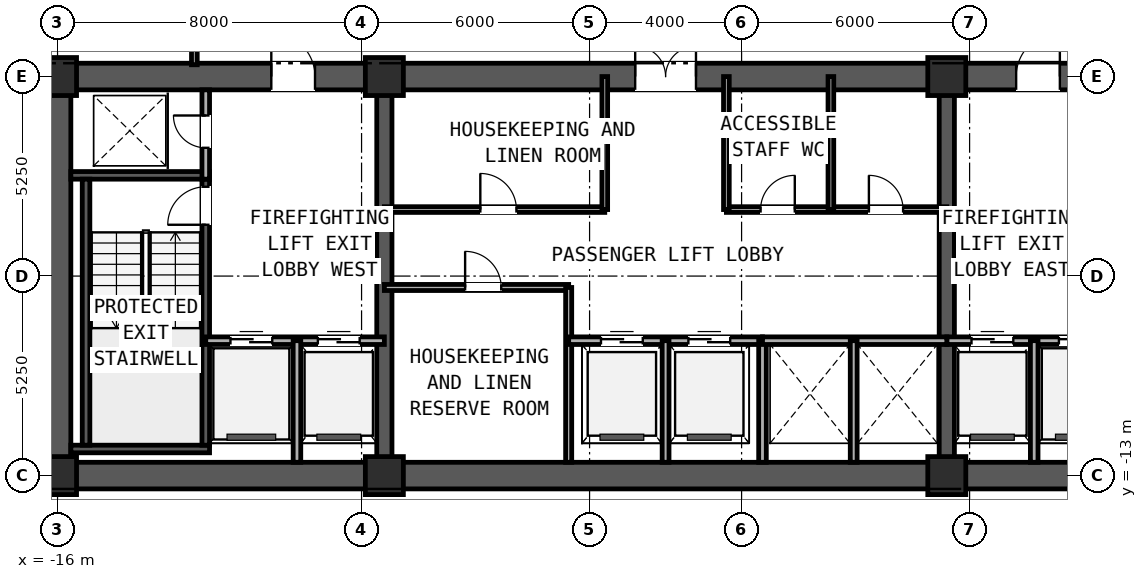
"""IFC4 building model, lengths in metres.
Left out: names, types, materials, properties, quantities, classifications, styles, units other than length and angle.
Written with IfcOpenShell. Run it as: python <this file> out.ifc"""

import sys

from ifc_helpers import new_model, si_unit, direction, frame, frame_2d, origin, origin_2d, place, context, subcontext, project, spatial, rectangle, extrude, element, fill, save


model = new_model("IFC4")
c1 = context("Model", 3, precision=1e-05, world=origin(), true_north=direction((0.0, 1.0)))
c2 = subcontext(c1, "Body", "Model", "MODEL_VIEW")
j1 = project(units=[si_unit("LENGTHUNIT", "METRE"), si_unit("PLANEANGLEUNIT", "RADIAN")], contexts=[c1])
p1 = place(None, origin())
s1 = spatial("IfcSite", under=j1, at=p1, CompositionType="ELEMENT")
p2 = place(p1, origin())
s2 = spatial("IfcBuilding", under=s1, at=p2, CompositionType="ELEMENT")
p3 = place(p2, frame((0.0, 0.0, 146.25)))
s3 = spatial("IfcBuildingStorey", under=s2, at=p3, CompositionType="ELEMENT", Elevation=146.25)
p4 = place(p3, frame((-16.35, -13.0, 0.0), z_axis=(0.0, 0.0, 1.0), x_axis=(1.0, 0.0, 0.0)))
e1 = element("IfcWall", 1, at=p4, inside=s3, PredefinedType="SHEAR", context=c2, shape_type="SweptSolid", body=[
    extrude(rectangle(XDim=32.7, YDim=0.7, at=frame_2d((16.35, 0.0))), origin(), (0.0, 0.0, 1.0), 2.91),
])
p5 = place(p3, frame((-16.35, -2.5, 0.0), z_axis=(0.0, 0.0, 1.0), x_axis=(1.0, 0.0, 0.0)))
e2 = element("IfcWall", 2, at=p5, inside=s3, PredefinedType="SHEAR", context=c2, shape_type="SweptSolid", body=[
    extrude(rectangle(XDim=32.7, YDim=0.7, at=frame_2d((16.35, 0.0))), origin(), (0.0, 0.0, 1.0), 2.91),
])
p6 = place(p5, frame((5.975, 0.0, 0.0)))
e3 = element("IfcOpeningElement", 3, at=p6, cuts=e2, PredefinedType="OPENING", context=c2, shape_type="SweptSolid", body=[
    extrude(rectangle(XDim=1.15, YDim=2.0, at=frame_2d((0.575, 1.0))), frame((0.0, 0.36, 0.0), z_axis=(0.0, -1.0, 0.0), x_axis=(1.0, 0.0, 0.0)), (0.0, 0.0, 1.0), 0.72),
])
p7 = place(p5, frame((15.55, 0.0, 0.0)))
e4 = element("IfcOpeningElement", 4, at=p7, cuts=e2, PredefinedType="OPENING", context=c2, shape_type="SweptSolid", body=[
    extrude(rectangle(XDim=1.6, YDim=2.0, at=frame_2d((0.8, 1.0))), frame((0.0, 0.36, 0.0), z_axis=(0.0, -1.0, 0.0), x_axis=(1.0, 0.0, 0.0)), (0.0, 0.0, 1.0), 0.72),
])
p8 = place(p5, frame((25.575, 0.0, 0.0)))
e5 = element("IfcOpeningElement", 5, at=p8, cuts=e2, PredefinedType="OPENING", context=c2, shape_type="SweptSolid", body=[
    extrude(rectangle(XDim=1.15, YDim=2.0, at=frame_2d((0.575, 1.0))), frame((0.0, 0.36, 0.0), z_axis=(0.0, -1.0, 0.0), x_axis=(1.0, 0.0, 0.0)), (0.0, 0.0, 1.0), 0.72),
])
p9 = place(p3, frame((-16.0, -12.65, 0.0), z_axis=(0.0, 0.0, 1.0), x_axis=(0.0, 1.0, 0.0)))
e6 = element("IfcWall", 6, at=p9, inside=s3, PredefinedType="SHEAR", context=c2, shape_type="SweptSolid", body=[
    extrude(rectangle(XDim=9.8, YDim=0.7, at=frame_2d((4.9, 0.0))), origin(), (0.0, 0.0, 1.0), 2.91),
])
for number, where, z_axis, x_axis in (
    (7, (-7.4, -12.65, 0.0), (0.0, 0.0, 1.0), (0.0, 1.0, 0.0)),
    (8, (7.4, -12.65, 0.0), (0.0, 0.0, 1.0), (0.0, 1.0, 0.0)),
):
    element("IfcWall", number, at=place(p3, frame(where, z_axis=z_axis, x_axis=x_axis)), inside=s3, PredefinedType="SHEAR", context=c2, shape_type="SweptSolid", body=[
        extrude(rectangle(XDim=9.8, YDim=0.4, at=frame_2d((4.9, 0.0))), origin(), (0.0, 0.0, 1.0), 3.19),
    ])
for number, where, z_axis, x_axis in (
    (9, (-15.65, -12.3, 0.0), (0.0, 0.0, 1.0), (1.0, 0.0, 0.0)),
    (10, (-15.65, -5.1, 0.0), (0.0, 0.0, 1.0), (1.0, 0.0, 0.0)),
):
    element("IfcWall", number, at=place(p3, frame(where, z_axis=z_axis, x_axis=x_axis)), inside=s3, PredefinedType="SOLIDWALL", context=c2, shape_type="SweptSolid", body=[
        extrude(rectangle(XDim=3.65, YDim=0.2, at=frame_2d((1.825, 0.0))), origin(), (0.0, 0.0, 1.0), 3.19),
    ])
p10 = place(p3, frame((-15.25, -12.2, 0.0), z_axis=(0.0, 0.0, 1.0), x_axis=(0.0, 1.0, 0.0)))
e11 = element("IfcWall", 11, at=p10, inside=s3, PredefinedType="SOLIDWALL", context=c2, shape_type="SweptSolid", body=[
    extrude(rectangle(XDim=7.0, YDim=0.2, at=frame_2d((3.5, 0.0))), origin(), (0.0, 0.0, 1.0), 3.19),
])
p11 = place(p3, frame((-12.1, -12.2, 0.0), z_axis=(0.0, 0.0, 1.0), x_axis=(0.0, 1.0, 0.0)))
e12 = element("IfcWall", 12, at=p11, inside=s3, PredefinedType="SOLIDWALL", context=c2, shape_type="SweptSolid", body=[
    extrude(rectangle(XDim=7.0, YDim=0.2, at=frame_2d((3.5, 0.0))), origin(), (0.0, 0.0, 1.0), 3.19),
])
p12 = place(p11, frame((5.8, 0.0, 0.0)))
e13 = element("IfcOpeningElement", 13, at=p12, cuts=e12, PredefinedType="OPENING", context=c2, shape_type="SweptSolid", body=[
    extrude(rectangle(XDim=1.0, YDim=2.1, at=frame_2d((0.5, 1.05))), frame((0.0, 0.11, 0.0), z_axis=(0.0, -1.0, 0.0), x_axis=(1.0, 0.0, 0.0)), (0.0, 0.0, 1.0), 0.22),
])
for number, where, z_axis, x_axis in (
    (14, (-16.0, -13.0, 0.0), (0.0, 0.0, 1.0), (1.0, 0.0, 0.0)),
    (15, (-7.4, -13.0, 0.0), (0.0, 0.0, 1.0), (1.0, 0.0, 0.0)),
    (16, (7.4, -13.0, 0.0), (0.0, 0.0, 1.0), (1.0, 0.0, 0.0)),
    (17, (-16.0, -2.5, 0.0), (0.0, 0.0, 1.0), (1.0, 0.0, 0.0)),
    (18, (-7.4, -2.5, 0.0), (0.0, 0.0, 1.0), (1.0, 0.0, 0.0)),
    (19, (7.4, -2.5, 0.0), (0.0, 0.0, 1.0), (1.0, 0.0, 0.0)),
):
    element("IfcColumn", number, at=place(p3, frame(where, z_axis=z_axis, x_axis=x_axis)), inside=s3, PredefinedType="COLUMN", context=c2, shape_type="SweptSolid", body=[
        extrude(rectangle(XDim=1.0, YDim=1.0, at=origin_2d()), origin(), (0.0, 0.0, 1.0), 3.45),
    ])
p13 = place(p3, frame((-26.695, -13.016, 0.0), z_axis=(0.0, 0.0, 1.0), x_axis=(0.995396268366, -0.095845025554, 0.0)))
e20 = element("IfcWall", 20, at=p13, inside=s3, PredefinedType="STANDARD", context=c2, shape_type="SweptSolid", body=[
    extrude(rectangle(XDim=49.6, YDim=0.24, at=frame_2d((24.8, 0.0))), origin(), (0.0, 0.0, 1.0), 3.19),
])
p14 = place(p13, frame((6.044, 0.0, 0.7)))
e21 = element("IfcOpeningElement", 21, at=p14, cuts=e20, PredefinedType="OPENING", context=c2, shape_type="SweptSolid", body=[
    extrude(rectangle(XDim=1.8, YDim=1.5, at=frame_2d((0.9, 0.75))), frame((0.0, 0.13, 0.0), z_axis=(0.0, -1.0, 0.0), x_axis=(1.0, 0.0, 0.0)), (0.0, 0.0, 1.0), 0.26),
])
p15 = place(p13, frame((41.756, 0.0, 0.7)))
e22 = element("IfcOpeningElement", 22, at=p15, cuts=e20, PredefinedType="OPENING", context=c2, shape_type="SweptSolid", body=[
    extrude(rectangle(XDim=1.8, YDim=1.5, at=frame_2d((0.9, 0.75))), frame((0.0, 0.13, 0.0), z_axis=(0.0, -1.0, 0.0), x_axis=(1.0, 0.0, 0.0)), (0.0, 0.0, 1.0), 0.26),
])
p16 = place(p3, frame((-12.1, -5.2, 0.0), z_axis=(0.0, 0.0, 1.0), x_axis=(0.0, 1.0, 0.0)))
e23 = element("IfcWall", 23, at=p16, inside=s3, PredefinedType="PARTITIONING", context=c2, shape_type="SweptSolid", body=[
    extrude(rectangle(XDim=2.35, YDim=0.2, at=frame_2d((1.175, 0.0))), origin(), (0.0, 0.0, 1.0), 2.225),
])
p17 = place(p16, frame((0.825, 0.0, 0.0)))
e24 = element("IfcOpeningElement", 24, at=p17, cuts=e23, PredefinedType="OPENING", context=c2, shape_type="SweptSolid", body=[
    extrude(rectangle(XDim=0.85, YDim=2.05, at=frame_2d((0.425, 1.025))), frame((0.0, 0.11, 0.0), z_axis=(0.0, -1.0, 0.0), x_axis=(1.0, 0.0, 0.0)), (0.0, 0.0, 1.0), 0.22),
])
p18 = place(p3, frame((-12.1, -9.45, 0.0), z_axis=(0.0, 0.0, 1.0), x_axis=(1.0, 0.0, 0.0)))
e25 = element("IfcWall", 25, at=p18, inside=s3, PredefinedType="PARTITIONING", context=c2, shape_type="SweptSolid", body=[
    extrude(rectangle(XDim=4.7, YDim=0.2, at=frame_2d((2.35, 0.0))), origin(), (0.0, 0.0, 1.0), 3.19),
])
p19 = place(p18, frame((0.65, 0.0, 0.0)))
e26 = element("IfcOpeningElement", 26, at=p19, cuts=e25, PredefinedType="OPENING", context=c2, shape_type="SweptSolid", body=[
    extrude(rectangle(XDim=1.1, YDim=2.2, at=frame_2d((0.55, 1.1))), frame((0.0, 0.11, 0.0), z_axis=(0.0, -1.0, 0.0), x_axis=(1.0, 0.0, 0.0)), (0.0, 0.0, 1.0), 0.22),
])
p20 = place(p18, frame((2.95, 0.0, 0.0)))
e27 = element("IfcOpeningElement", 27, at=p20, cuts=e25, PredefinedType="OPENING", context=c2, shape_type="SweptSolid", body=[
    extrude(rectangle(XDim=1.1, YDim=2.2, at=frame_2d((0.55, 1.1))), frame((0.0, 0.11, 0.0), z_axis=(0.0, -1.0, 0.0), x_axis=(1.0, 0.0, 0.0)), (0.0, 0.0, 1.0), 0.22),
])
p21 = place(p3, frame((-9.7, -12.65, 0.0), z_axis=(0.0, 0.0, 1.0), x_axis=(0.0, 1.0, 0.0)))
e28 = element("IfcWall", 28, at=p21, inside=s3, PredefinedType="PARTITIONING", context=c2, shape_type="SweptSolid", body=[
    extrude(rectangle(XDim=3.2, YDim=0.2, at=frame_2d((1.6, 0.0))), origin(), (0.0, 0.0, 1.0), 2.225),
])
p22 = place(p3, frame((7.4, -9.45, 0.0), z_axis=(0.0, 0.0, 1.0), x_axis=(1.0, 0.0, 0.0)))
e29 = element("IfcWall", 29, at=p22, inside=s3, PredefinedType="PARTITIONING", context=c2, shape_type="SweptSolid", body=[
    extrude(rectangle(XDim=4.7, YDim=0.2, at=frame_2d((2.35, 0.0))), origin(), (0.0, 0.0, 1.0), 3.19),
])
p23 = place(p22, frame((2.95, 0.0, 0.0)))
e30 = element("IfcOpeningElement", 30, at=p23, cuts=e29, PredefinedType="OPENING", context=c2, shape_type="SweptSolid", body=[
    extrude(rectangle(XDim=1.1, YDim=2.2, at=frame_2d((0.55, 1.1))), frame((0.0, 0.11, 0.0), z_axis=(0.0, -1.0, 0.0), x_axis=(1.0, 0.0, 0.0)), (0.0, 0.0, 1.0), 0.22),
])
p24 = place(p22, frame((0.65, 0.0, 0.0)))
e31 = element("IfcOpeningElement", 31, at=p24, cuts=e29, PredefinedType="OPENING", context=c2, shape_type="SweptSolid", body=[
    extrude(rectangle(XDim=1.1, YDim=2.2, at=frame_2d((0.55, 1.1))), frame((0.0, 0.11, 0.0), z_axis=(0.0, -1.0, 0.0), x_axis=(1.0, 0.0, 0.0)), (0.0, 0.0, 1.0), 0.22),
])
p25 = place(p3, frame((9.7, -12.65, 0.0), z_axis=(0.0, 0.0, 1.0), x_axis=(0.0, 1.0, 0.0)))
e32 = element("IfcWall", 32, at=p25, inside=s3, PredefinedType="PARTITIONING", context=c2, shape_type="SweptSolid", body=[
    extrude(rectangle(XDim=3.2, YDim=0.2, at=frame_2d((1.6, 0.0))), origin(), (0.0, 0.0, 1.0), 2.225),
])
p26 = place(p3, frame((-7.4, -8.05, 0.0), z_axis=(0.0, 0.0, 1.0), x_axis=(1.0, 0.0, 0.0)))
e33 = element("IfcWall", 33, at=p26, inside=s3, PredefinedType="PARTITIONING", context=c2, shape_type="SweptSolid", body=[
    extrude(rectangle(XDim=4.85, YDim=0.16, at=frame_2d((2.425, 0.0))), origin(), (0.0, 0.0, 1.0), 3.19),
])
p27 = place(p26, frame((2.125, 0.0, 0.0)))
e34 = element("IfcOpeningElement", 34, at=p27, cuts=e33, PredefinedType="OPENING", context=c2, shape_type="SweptSolid", body=[
    extrude(rectangle(XDim=0.95, YDim=2.15, at=frame_2d((0.475, 1.075))), frame((0.0, 0.09, 0.0), z_axis=(0.0, -1.0, 0.0), x_axis=(1.0, 0.0, 0.0)), (0.0, 0.0, 1.0), 0.18),
])
p28 = place(p3, frame((-2.55, -12.65, 0.0), z_axis=(0.0, 0.0, 1.0), x_axis=(0.0, 1.0, 0.0)))
e35 = element("IfcWall", 35, at=p28, inside=s3, PredefinedType="PARTITIONING", context=c2, shape_type="SweptSolid", body=[
    extrude(rectangle(XDim=4.6, YDim=0.16, at=frame_2d((2.3, 0.0))), origin(), (0.0, 0.0, 1.0), 2.225),
])
p29 = place(p3, frame((-2.55, -9.45, 0.0), z_axis=(0.0, 0.0, 1.0), x_axis=(1.0, 0.0, 0.0)))
e36 = element("IfcWall", 36, at=p29, inside=s3, PredefinedType="PARTITIONING", context=c2, shape_type="SweptSolid", body=[
    extrude(rectangle(XDim=5.1, YDim=0.2, at=frame_2d((2.55, 0.0))), origin(), (0.0, 0.0, 1.0), 3.19),
])
p30 = place(p29, frame((0.85, 0.0, 0.0)))
e37 = element("IfcOpeningElement", 37, at=p30, cuts=e36, PredefinedType="OPENING", context=c2, shape_type="SweptSolid", body=[
    extrude(rectangle(XDim=1.1, YDim=2.2, at=frame_2d((0.55, 1.1))), frame((0.0, 0.11, 0.0), z_axis=(0.0, -1.0, 0.0), x_axis=(1.0, 0.0, 0.0)), (0.0, 0.0, 1.0), 0.22),
])
p31 = place(p29, frame((3.15, 0.0, 0.0)))
e38 = element("IfcOpeningElement", 38, at=p31, cuts=e36, PredefinedType="OPENING", context=c2, shape_type="SweptSolid", body=[
    extrude(rectangle(XDim=1.1, YDim=2.2, at=frame_2d((0.55, 1.1))), frame((0.0, 0.11, 0.0), z_axis=(0.0, -1.0, 0.0), x_axis=(1.0, 0.0, 0.0)), (0.0, 0.0, 1.0), 0.22),
])
p32 = place(p3, frame((0.0, -12.65, 0.0), z_axis=(0.0, 0.0, 1.0), x_axis=(0.0, 1.0, 0.0)))
e39 = element("IfcWall", 39, at=p32, inside=s3, PredefinedType="PARTITIONING", context=c2, shape_type="SweptSolid", body=[
    extrude(rectangle(XDim=3.2, YDim=0.18, at=frame_2d((1.6, 0.0))), origin(), (0.0, 0.0, 1.0), 2.225),
])
p33 = place(p3, frame((2.55, -12.65, 0.0), z_axis=(0.0, 0.0, 1.0), x_axis=(0.0, 1.0, 0.0)))
e40 = element("IfcWall", 40, at=p33, inside=s3, PredefinedType="PARTITIONING", context=c2, shape_type="SweptSolid", body=[
    extrude(rectangle(XDim=3.2, YDim=0.2, at=frame_2d((1.6, 0.0))), origin(), (0.0, 0.0, 1.0), 2.225),
])
p34 = place(p3, frame((2.55, -9.45, 0.0), z_axis=(0.0, 0.0, 1.0), x_axis=(1.0, 0.0, 0.0)))
e41 = element("IfcWall", 41, at=p34, inside=s3, PredefinedType="PARTITIONING", context=c2, shape_type="SweptSolid", body=[
    extrude(rectangle(XDim=4.85, YDim=0.2, at=frame_2d((2.425, 0.0))), origin(), (0.0, 0.0, 1.0), 3.19),
])
p35 = place(p3, frame((4.95, -12.65, 0.0), z_axis=(0.0, 0.0, 1.0), x_axis=(0.0, 1.0, 0.0)))
e42 = element("IfcWall", 42, at=p35, inside=s3, PredefinedType="PARTITIONING", context=c2, shape_type="SweptSolid", body=[
    extrude(rectangle(XDim=3.2, YDim=0.18, at=frame_2d((1.6, 0.0))), origin(), (0.0, 0.0, 1.0), 2.225),
])
p36 = place(p3, frame((-7.4, -6.0, 0.0), z_axis=(0.0, 0.0, 1.0), x_axis=(1.0, 0.0, 0.0)))
e43 = element("IfcWall", 43, at=p36, inside=s3, PredefinedType="PARTITIONING", context=c2, shape_type="SweptSolid", body=[
    extrude(rectangle(XDim=5.8, YDim=0.15, at=frame_2d((2.9, 0.0))), origin(), (0.0, 0.0, 1.0), 3.19),
])
p37 = place(p36, frame((2.525, 0.0, 0.0)))
e44 = element("IfcOpeningElement", 44, at=p37, cuts=e43, PredefinedType="OPENING", context=c2, shape_type="SweptSolid", body=[
    extrude(rectangle(XDim=0.95, YDim=2.15, at=frame_2d((0.475, 1.075))), frame((0.0, 0.085, 0.0), z_axis=(0.0, -1.0, 0.0), x_axis=(1.0, 0.0, 0.0)), (0.0, 0.0, 1.0), 0.17),
])
p38 = place(p3, frame((-1.6, -6.0, 0.0), z_axis=(0.0, 0.0, 1.0), x_axis=(0.0, 1.0, 0.0)))
e45 = element("IfcWall", 45, at=p38, inside=s3, PredefinedType="PARTITIONING", context=c2, shape_type="SweptSolid", body=[
    extrude(rectangle(XDim=3.5, YDim=0.15, at=frame_2d((1.75, 0.0))), origin(), (0.0, 0.0, 1.0), 2.225),
])
p39 = place(p3, frame((1.6, -6.0, 0.0), z_axis=(0.0, 0.0, 1.0), x_axis=(1.0, 0.0, 0.0)))
e46 = element("IfcWall", 46, at=p39, inside=s3, PredefinedType="PARTITIONING", context=c2, shape_type="SweptSolid", body=[
    extrude(rectangle(XDim=5.8, YDim=0.15, at=frame_2d((2.9, 0.0))), origin(), (0.0, 0.0, 1.0), 3.19),
])
p40 = place(p39, frame((0.9, 0.0, 0.0)))
e47 = element("IfcOpeningElement", 47, at=p40, cuts=e46, PredefinedType="OPENING", context=c2, shape_type="SweptSolid", body=[
    extrude(rectangle(XDim=0.9, YDim=2.1, at=frame_2d((0.45, 1.05))), frame((0.0, 0.085, 0.0), z_axis=(0.0, -1.0, 0.0), x_axis=(1.0, 0.0, 0.0)), (0.0, 0.0, 1.0), 0.17),
])
p41 = place(p39, frame((3.75, 0.0, 0.0)))
e48 = element("IfcOpeningElement", 48, at=p41, cuts=e46, PredefinedType="OPENING", context=c2, shape_type="SweptSolid", body=[
    extrude(rectangle(XDim=0.9, YDim=2.1, at=frame_2d((0.45, 1.05))), frame((0.0, 0.085, 0.0), z_axis=(0.0, -1.0, 0.0), x_axis=(1.0, 0.0, 0.0)), (0.0, 0.0, 1.0), 0.17),
])
for number, where, z_axis, x_axis in (
    (49, (1.6, -6.0, 0.0), (0.0, 0.0, 1.0), (0.0, 1.0, 0.0)),
    (50, (4.35, -6.0, 0.0), (0.0, 0.0, 1.0), (0.0, 1.0, 0.0)),
):
    element("IfcWall", number, at=place(p3, frame(where, z_axis=z_axis, x_axis=x_axis)), inside=s3, PredefinedType="PARTITIONING", context=c2, shape_type="SweptSolid", body=[
        extrude(rectangle(XDim=3.5, YDim=0.15, at=frame_2d((1.75, 0.0))), origin(), (0.0, 0.0, 1.0), 2.225),
    ])
p42 = place(p3, frame((-12.4, -2.19, 0.0), z_axis=(0.0, 0.0, 1.0), x_axis=(0.0, 1.0, 0.0)))
e51 = element("IfcWall", 51, at=p42, inside=s3, PredefinedType="PARTITIONING", context=c2, shape_type="SweptSolid", body=[
    extrude(rectangle(XDim=2.78, YDim=0.15, at=frame_2d((1.39, 0.0))), origin(), (0.0, 0.0, 1.0), 2.225),
])
p43 = place(p12, frame((1.0, 0.0, 0.0), z_axis=(0.0, 0.0, 1.0), x_axis=(-1.0, 0.0, 0.0)))
e52 = element("IfcDoor", 52, at=p43, inside=s3, OperationType="SINGLE_SWING_LEFT", PredefinedType="DOOR", context=c2, shape_type="SweptSolid", body=[
    extrude(rectangle(XDim=1.0, YDim=2.1, at=frame_2d((0.5, 1.05))), frame((0.0, 0.025, 0.0), z_axis=(0.0, -1.0, 0.0), x_axis=(1.0, 0.0, 0.0)), (0.0, 0.0, 1.0), 0.05),
])
fill(e13, e52)
p44 = place(p17, origin())
e53 = element("IfcDoor", 53, at=p44, inside=s3, OperationType="SINGLE_SWING_RIGHT", PredefinedType="DOOR", context=c2, shape_type="SweptSolid", body=[
    extrude(rectangle(XDim=0.85, YDim=2.05, at=frame_2d((0.425, 1.025))), frame((0.0, 0.025, 0.0), z_axis=(0.0, -1.0, 0.0), x_axis=(1.0, 0.0, 0.0)), (0.0, 0.0, 1.0), 0.05),
])
fill(e24, e53)
p45 = place(p19, origin())
e54 = element("IfcDoor", 54, at=p45, inside=s3, OperationType="SLIDING_TO_LEFT", PredefinedType="DOOR", context=c2, shape_type="SweptSolid", body=[
    extrude(rectangle(XDim=1.1, YDim=2.2, at=frame_2d((0.55, 1.1))), frame((0.0, 0.025, 0.0), z_axis=(0.0, -1.0, 0.0), x_axis=(1.0, 0.0, 0.0)), (0.0, 0.0, 1.0), 0.05),
])
fill(e26, e54)
p46 = place(p20, origin())
e55 = element("IfcDoor", 55, at=p46, inside=s3, OperationType="SLIDING_TO_RIGHT", PredefinedType="DOOR", context=c2, shape_type="SweptSolid", body=[
    extrude(rectangle(XDim=1.1, YDim=2.2, at=frame_2d((0.55, 1.1))), frame((0.0, 0.025, 0.0), z_axis=(0.0, -1.0, 0.0), x_axis=(1.0, 0.0, 0.0)), (0.0, 0.0, 1.0), 0.05),
])
fill(e27, e55)
p47 = place(p23, origin())
e56 = element("IfcDoor", 56, at=p47, inside=s3, OperationType="SLIDING_TO_LEFT", PredefinedType="DOOR", context=c2, shape_type="SweptSolid", body=[
    extrude(rectangle(XDim=1.1, YDim=2.2, at=frame_2d((0.55, 1.1))), frame((0.0, 0.025, 0.0), z_axis=(0.0, -1.0, 0.0), x_axis=(1.0, 0.0, 0.0)), (0.0, 0.0, 1.0), 0.05),
])
fill(e30, e56)
p48 = place(p24, origin())
e57 = element("IfcDoor", 57, at=p48, inside=s3, OperationType="SLIDING_TO_RIGHT", PredefinedType="DOOR", context=c2, shape_type="SweptSolid", body=[
    extrude(rectangle(XDim=1.1, YDim=2.2, at=frame_2d((0.55, 1.1))), frame((0.0, 0.025, 0.0), z_axis=(0.0, -1.0, 0.0), x_axis=(1.0, 0.0, 0.0)), (0.0, 0.0, 1.0), 0.05),
])
fill(e31, e57)
p49 = place(p6, origin())
e58 = element("IfcDoor", 58, at=p49, inside=s3, OperationType="SINGLE_SWING_LEFT", PredefinedType="DOOR", context=c2, shape_type="SweptSolid", body=[
    extrude(rectangle(XDim=1.15, YDim=2.0, at=frame_2d((0.575, 1.0))), frame((0.0, 0.025, 0.0), z_axis=(0.0, -1.0, 0.0), x_axis=(1.0, 0.0, 0.0)), (0.0, 0.0, 1.0), 0.05),
])
fill(e3, e58)
p50 = place(p7, origin())
e59 = element("IfcDoor", 59, at=p50, inside=s3, OperationType="DOUBLE_DOOR_SINGLE_SWING", PredefinedType="DOOR", context=c2, shape_type="SweptSolid", body=[
    extrude(rectangle(XDim=1.6, YDim=2.0, at=frame_2d((0.8, 1.0))), frame((0.0, 0.025, 0.0), z_axis=(0.0, -1.0, 0.0), x_axis=(1.0, 0.0, 0.0)), (0.0, 0.0, 1.0), 0.05),
])
fill(e4, e59)
p51 = place(p8, origin())
e60 = element("IfcDoor", 60, at=p51, inside=s3, OperationType="SINGLE_SWING_RIGHT", PredefinedType="DOOR", context=c2, shape_type="SweptSolid", body=[
    extrude(rectangle(XDim=1.15, YDim=2.0, at=frame_2d((0.575, 1.0))), frame((0.0, 0.025, 0.0), z_axis=(0.0, -1.0, 0.0), x_axis=(1.0, 0.0, 0.0)), (0.0, 0.0, 1.0), 0.05),
])
fill(e5, e60)
p52 = place(p27, origin())
e61 = element("IfcDoor", 61, at=p52, inside=s3, OperationType="SINGLE_SWING_LEFT", PredefinedType="DOOR", context=c2, shape_type="SweptSolid", body=[
    extrude(rectangle(XDim=0.95, YDim=2.15, at=frame_2d((0.475, 1.075))), frame((0.0, 0.025, 0.0), z_axis=(0.0, -1.0, 0.0), x_axis=(1.0, 0.0, 0.0)), (0.0, 0.0, 1.0), 0.05),
])
fill(e34, e61)
p53 = place(p30, origin())
e62 = element("IfcDoor", 62, at=p53, inside=s3, OperationType="SLIDING_TO_RIGHT", PredefinedType="DOOR", context=c2, shape_type="SweptSolid", body=[
    extrude(rectangle(XDim=1.1, YDim=2.2, at=frame_2d((0.55, 1.1))), frame((0.0, 0.025, 0.0), z_axis=(0.0, -1.0, 0.0), x_axis=(1.0, 0.0, 0.0)), (0.0, 0.0, 1.0), 0.05),
])
fill(e37, e62)
p54 = place(p31, origin())
e63 = element("IfcDoor", 63, at=p54, inside=s3, OperationType="SLIDING_TO_RIGHT", PredefinedType="DOOR", context=c2, shape_type="SweptSolid", body=[
    extrude(rectangle(XDim=1.1, YDim=2.2, at=frame_2d((0.55, 1.1))), frame((0.0, 0.025, 0.0), z_axis=(0.0, -1.0, 0.0), x_axis=(1.0, 0.0, 0.0)), (0.0, 0.0, 1.0), 0.05),
])
fill(e38, e63)
p55 = place(p37, frame((0.95, 0.0, 0.0), z_axis=(0.0, 0.0, 1.0), x_axis=(-1.0, 0.0, 0.0)))
e64 = element("IfcDoor", 64, at=p55, inside=s3, OperationType="SINGLE_SWING_LEFT", PredefinedType="DOOR", context=c2, shape_type="SweptSolid", body=[
    extrude(rectangle(XDim=0.95, YDim=2.15, at=frame_2d((0.475, 1.075))), frame((0.0, 0.025, 0.0), z_axis=(0.0, -1.0, 0.0), x_axis=(1.0, 0.0, 0.0)), (0.0, 0.0, 1.0), 0.05),
])
fill(e44, e64)
p56 = place(p40, frame((0.9, 0.0, 0.0), z_axis=(0.0, 0.0, 1.0), x_axis=(-1.0, 0.0, 0.0)))
e65 = element("IfcDoor", 65, at=p56, inside=s3, OperationType="SINGLE_SWING_RIGHT", PredefinedType="DOOR", context=c2, shape_type="SweptSolid", body=[
    extrude(rectangle(XDim=0.9, YDim=2.1, at=frame_2d((0.45, 1.05))), frame((0.0, 0.025, 0.0), z_axis=(0.0, -1.0, 0.0), x_axis=(1.0, 0.0, 0.0)), (0.0, 0.0, 1.0), 0.05),
])
fill(e47, e65)
p57 = place(p41, frame((0.9, 0.0, 0.0), z_axis=(0.0, 0.0, 1.0), x_axis=(-1.0, 0.0, 0.0)))
e66 = element("IfcDoor", 66, at=p57, inside=s3, OperationType="SINGLE_SWING_LEFT", PredefinedType="DOOR", context=c2, shape_type="SweptSolid", body=[
    extrude(rectangle(XDim=0.9, YDim=2.1, at=frame_2d((0.45, 1.05))), frame((0.0, 0.025, 0.0), z_axis=(0.0, -1.0, 0.0), x_axis=(1.0, 0.0, 0.0)), (0.0, 0.0, 1.0), 0.05),
])
fill(e48, e66)
save(model, sys.argv[1])
